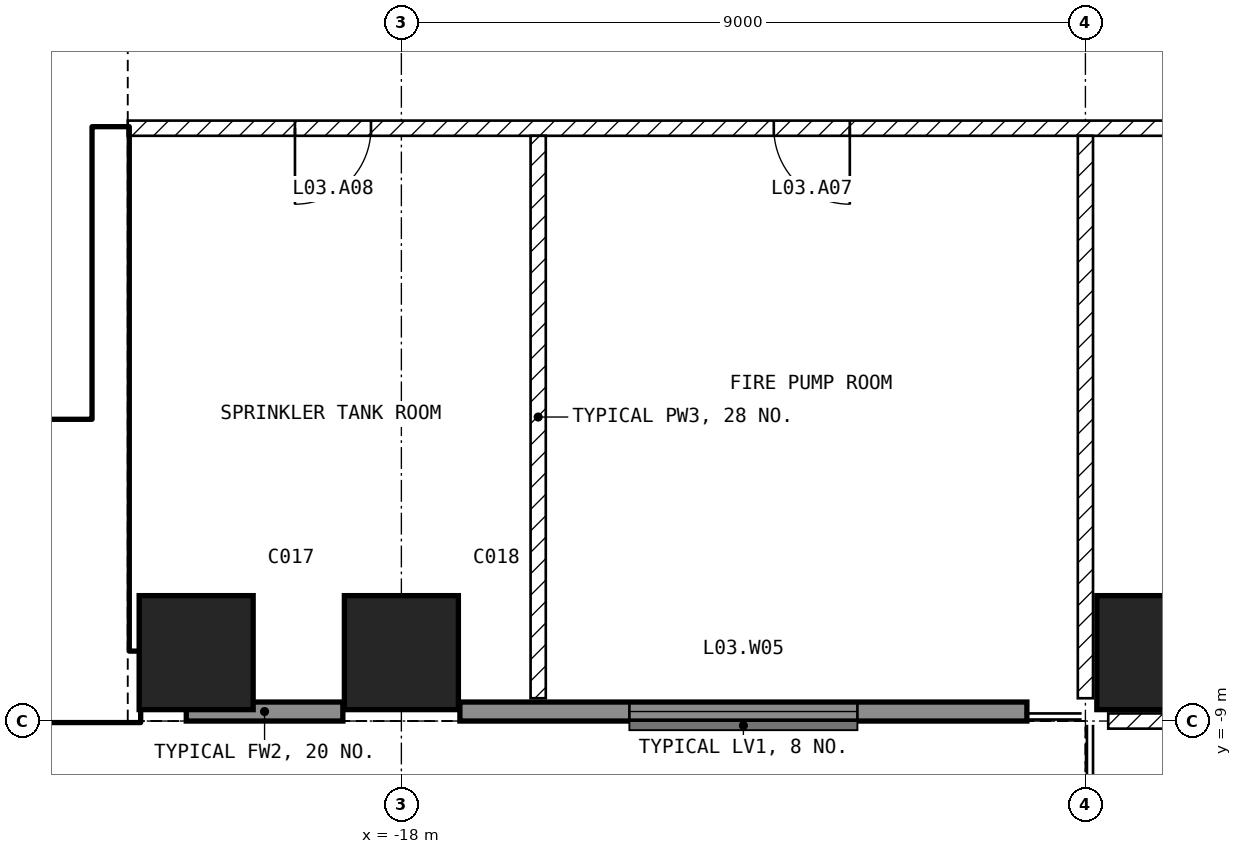
"""IFC4 building model, lengths in metres.
Left out: names, types, materials, properties, quantities, classifications, styles, units other than length and angle.
Written with IfcOpenShell. Run it as: python <this file> out.ifc"""

import sys

from ifc_helpers import new_model, si_unit, direction, frame, frame_2d, origin, origin_2d, place, context, subcontext, project, spatial, rectangle, extrude, element, fill, save


model = new_model("IFC4")
c1 = context("Model", 3, precision=1e-05, world=origin(), true_north=direction((0.0, 1.0)))
c2 = subcontext(c1, "Body", "Model", "MODEL_VIEW")
j1 = project(units=[si_unit("LENGTHUNIT", "METRE"), si_unit("PLANEANGLEUNIT", "RADIAN")], contexts=[c1])
p1 = place(None, origin())
s1 = spatial("IfcSite", under=j1, at=p1, CompositionType="ELEMENT")
p2 = place(p1, origin())
s2 = spatial("IfcBuilding", under=s1, at=p2, CompositionType="ELEMENT")
p3 = place(p2, frame((0.0, 0.0, 27.0)))
s3 = spatial("IfcBuildingStorey", under=s2, at=p3, CompositionType="ELEMENT", Elevation=27.0)
for number, where, z_axis, x_axis in (
    (1, (-20.7, -8.1, -0.45), (0.0, 0.0, 1.0), (1.0, 0.0, 0.0)),
    (2, (-18.0, -8.1, -0.45), (0.0, 0.0, 1.0), (1.0, 0.0, 0.0)),
    (3, (-8.1, -8.1, -0.45), (0.0, 0.0, 1.0), (1.0, 0.0, 0.0)),
):
    element("IfcColumn", number, at=place(p3, frame(where, z_axis=z_axis, x_axis=x_axis)), inside=s3, PredefinedType="COLUMN", context=c2, shape_type="SweptSolid", body=[
        extrude(rectangle(XDim=1.5, YDim=1.5, at=origin_2d()), origin(), (0.0, 0.0, 1.0), 5.15),
    ])
p4 = place(p3, frame((-20.83, -8.875, 0.0), z_axis=(0.0, 0.0, 1.0), x_axis=(1.0, 0.0, 0.0)))
e4 = element("IfcWall", 4, at=p4, inside=s3, PredefinedType="SOLIDWALL", context=c2, shape_type="SweptSolid", body=[
    extrude(rectangle(XDim=2.06, YDim=0.25, at=frame_2d((1.03, 0.0))), origin(), (0.0, 0.0, 1.0), 4.7),
])
p5 = place(p3, frame((-17.23, -8.875, 0.0), z_axis=(0.0, 0.0, 1.0), x_axis=(1.0, 0.0, 0.0)))
e5 = element("IfcWall", 5, at=p5, inside=s3, PredefinedType="SOLIDWALL", context=c2, shape_type="SweptSolid", body=[
    extrude(rectangle(XDim=7.46, YDim=0.25, at=frame_2d((3.73, 0.0))), origin(), (0.0, 0.0, 1.0), 4.7),
])
p6 = place(p5, frame((2.23, 0.0, 1.0)))
e6 = element("IfcOpeningElement", 6, at=p6, cuts=e5, PredefinedType="OPENING", context=c2, shape_type="SweptSolid", body=[
    extrude(rectangle(XDim=3.0, YDim=2.4, at=frame_2d((1.5, 1.2))), frame((0.0, 0.135, 0.0), z_axis=(0.0, -1.0, 0.0), x_axis=(1.0, 0.0, 0.0)), (0.0, 0.0, 1.0), 0.27),
])
p7 = place(p3, frame((-32.4, -8.55, 0.0), z_axis=(0.0, 0.0, 1.0), x_axis=(1.0, 0.0, 0.0)))
e7 = element("IfcWall", 7, at=p7, inside=s3, PredefinedType="SHEAR", context=c2, shape_type="SweptSolid", body=[
    extrude(rectangle(XDim=10.95, YDim=0.9, at=frame_2d((5.475, 0.0))), origin(), (0.0, 0.0, 1.0), 4.7),
])
p8 = place(p3, frame((-21.825, -8.1, 0.0), z_axis=(0.0, 0.0, 1.0), x_axis=(0.0, 1.0, 0.0)))
e8 = element("IfcWall", 8, at=p8, inside=s3, PredefinedType="SHEAR", context=c2, shape_type="SweptSolid", body=[
    extrude(rectangle(XDim=6.9, YDim=0.45, at=frame_2d((3.45, 0.0))), origin(), (0.0, 0.0, 1.0), 4.7),
])
p9 = place(p3, frame((-28.35, -5.15, 0.0), z_axis=(0.0, 0.0, 1.0), x_axis=(1.0, 0.0, 0.0)))
e9 = element("IfcWall", 9, at=p9, inside=s3, PredefinedType="SOLIDWALL", context=c2, shape_type="SweptSolid", body=[
    extrude(rectangle(XDim=6.3, YDim=0.2, at=frame_2d((3.15, 0.0))), origin(), (0.0, 0.0, 1.0), 4.7),
])
p10 = place(p9, frame((5.1, 0.0, 0.0)))
e10 = element("IfcOpeningElement", 10, at=p10, cuts=e9, PredefinedType="OPENING", context=c2, shape_type="SweptSolid", body=[
    extrude(rectangle(XDim=1.0, YDim=2.1, at=frame_2d((0.5, 1.05))), frame((0.0, 0.11, 0.0), z_axis=(0.0, -1.0, 0.0), x_axis=(1.0, 0.0, 0.0)), (0.0, 0.0, 1.0), 0.22),
])
p11 = place(p3, frame((21.6, -1.2, 0.0), z_axis=(0.0, 0.0, 1.0), x_axis=(-1.0, 0.0, 0.0)))
e11 = element("IfcWall", 11, at=p11, inside=s3, PredefinedType="PARTITIONING", context=c2, shape_type="SweptSolid", body=[
    extrude(rectangle(XDim=43.2, YDim=0.2, at=frame_2d((21.6, 0.0))), origin(), (0.0, 0.0, 1.0), 4.7),
])
p12 = place(p11, frame((21.1, 0.0, 0.0)))
e12 = element("IfcOpeningElement", 12, at=p12, cuts=e11, PredefinedType="OPENING", context=c2, shape_type="SweptSolid", body=[
    extrude(rectangle(XDim=1.0, YDim=2.1, at=frame_2d((0.5, 1.05))), frame((0.0, 0.11, 0.0), z_axis=(0.0, -1.0, 0.0), x_axis=(1.0, 0.0, 0.0)), (0.0, 0.0, 1.0), 0.22),
])
p13 = place(p11, frame((9.1, 0.0, 0.0)))
e13 = element("IfcOpeningElement", 13, at=p13, cuts=e11, PredefinedType="OPENING", context=c2, shape_type="SweptSolid", body=[
    extrude(rectangle(XDim=1.0, YDim=2.1, at=frame_2d((0.5, 1.05))), frame((0.0, 0.11, 0.0), z_axis=(0.0, -1.0, 0.0), x_axis=(1.0, 0.0, 0.0)), (0.0, 0.0, 1.0), 0.22),
])
p14 = place(p11, frame((2.8, 0.0, 0.0)))
e14 = element("IfcOpeningElement", 14, at=p14, cuts=e11, PredefinedType="OPENING", context=c2, shape_type="SweptSolid", body=[
    extrude(rectangle(XDim=1.0, YDim=2.1, at=frame_2d((0.5, 1.05))), frame((0.0, 0.11, 0.0), z_axis=(0.0, -1.0, 0.0), x_axis=(1.0, 0.0, 0.0)), (0.0, 0.0, 1.0), 0.22),
])
p15 = place(p11, frame((33.7, 0.0, 0.0)))
e15 = element("IfcOpeningElement", 15, at=p15, cuts=e11, PredefinedType="OPENING", context=c2, shape_type="SweptSolid", body=[
    extrude(rectangle(XDim=1.0, YDim=2.1, at=frame_2d((0.5, 1.05))), frame((0.0, 0.11, 0.0), z_axis=(0.0, -1.0, 0.0), x_axis=(1.0, 0.0, 0.0)), (0.0, 0.0, 1.0), 0.22),
])
p16 = place(p11, frame((40.0, 0.0, 0.0)))
e16 = element("IfcOpeningElement", 16, at=p16, cuts=e11, PredefinedType="OPENING", context=c2, shape_type="SweptSolid", body=[
    extrude(rectangle(XDim=1.0, YDim=2.1, at=frame_2d((0.5, 1.05))), frame((0.0, 0.11, 0.0), z_axis=(0.0, -1.0, 0.0), x_axis=(1.0, 0.0, 0.0)), (0.0, 0.0, 1.0), 0.22),
])
p17 = place(p3, frame((-9.0, -8.7, 0.0), z_axis=(0.0, 0.0, 1.0), x_axis=(0.0, 1.0, 0.0)))
e17 = element("IfcWall", 17, at=p17, inside=s3, PredefinedType="PARTITIONING", context=c2, shape_type="SweptSolid", body=[
    extrude(rectangle(XDim=7.4, YDim=0.2, at=frame_2d((3.7, 0.0))), origin(), (0.0, 0.0, 1.0), 4.7),
])
p18 = place(p3, frame((8.7, -9.0, 0.0), z_axis=(0.0, 0.0, 1.0), x_axis=(-1.0, 0.0, 0.0)))
e18 = element("IfcWall", 18, at=p18, inside=s3, PredefinedType="PARTITIONING", context=c2, shape_type="SweptSolid", body=[
    extrude(rectangle(XDim=17.4, YDim=0.2, at=frame_2d((8.7, 0.0))), origin(), (0.0, 0.0, 1.0), 4.7),
])
p19 = place(p18, frame((8.2, 0.0, 0.0)))
e19 = element("IfcOpeningElement", 19, at=p19, cuts=e18, PredefinedType="OPENING", context=c2, shape_type="SweptSolid", body=[
    extrude(rectangle(XDim=1.0, YDim=2.1, at=frame_2d((0.5, 1.05))), frame((0.0, 0.11, 0.0), z_axis=(0.0, -1.0, 0.0), x_axis=(1.0, 0.0, 0.0)), (0.0, 0.0, 1.0), 0.22),
])
p20 = place(p3, frame((-16.2, -8.7, 0.0), z_axis=(0.0, 0.0, 1.0), x_axis=(0.0, 1.0, 0.0)))
e20 = element("IfcWall", 20, at=p20, inside=s3, PredefinedType="PARTITIONING", context=c2, shape_type="SweptSolid", body=[
    extrude(rectangle(XDim=7.4, YDim=0.2, at=frame_2d((3.7, 0.0))), origin(), (0.0, 0.0, 1.0), 4.7),
])
p21 = place(p6, origin())
e21 = element("IfcWindow", 21, at=p21, inside=s3, PartitioningType="SINGLE_PANEL", PredefinedType="WINDOW", context=c2, shape_type="SweptSolid", body=[
    extrude(rectangle(XDim=3.0, YDim=2.4, at=frame_2d((1.5, 1.2))), frame((0.0, 0.03, 0.0), z_axis=(0.0, -1.0, 0.0), x_axis=(1.0, 0.0, 0.0)), (0.0, 0.0, 1.0), 0.06),
])
fill(e6, e21)
p22 = place(p10, origin())
e22 = element("IfcDoor", 22, at=p22, inside=s3, OperationType="SINGLE_SWING_LEFT", PredefinedType="DOOR", context=c2, shape_type="SweptSolid", body=[
    extrude(rectangle(XDim=1.0, YDim=2.1, at=frame_2d((0.5, 1.05))), frame((0.0, 0.025, 0.0), z_axis=(0.0, -1.0, 0.0), x_axis=(1.0, 0.0, 0.0)), (0.0, 0.0, 1.0), 0.05),
])
fill(e10, e22)
p23 = place(p15, origin())
e23 = element("IfcDoor", 23, at=p23, inside=s3, OperationType="SINGLE_SWING_LEFT", PredefinedType="DOOR", context=c2, shape_type="SweptSolid", body=[
    extrude(rectangle(XDim=1.0, YDim=2.1, at=frame_2d((0.5, 1.05))), frame((0.0, 0.025, 0.0), z_axis=(0.0, -1.0, 0.0), x_axis=(1.0, 0.0, 0.0)), (0.0, 0.0, 1.0), 0.05),
])
fill(e15, e23)
p24 = place(p16, origin())
e24 = element("IfcDoor", 24, at=p24, inside=s3, OperationType="SINGLE_SWING_RIGHT", PredefinedType="DOOR", context=c2, shape_type="SweptSolid", body=[
    extrude(rectangle(XDim=1.0, YDim=2.1, at=frame_2d((0.5, 1.05))), frame((0.0, 0.025, 0.0), z_axis=(0.0, -1.0, 0.0), x_axis=(1.0, 0.0, 0.0)), (0.0, 0.0, 1.0), 0.05),
])
fill(e16, e24)
save(model, sys.argv[1])
